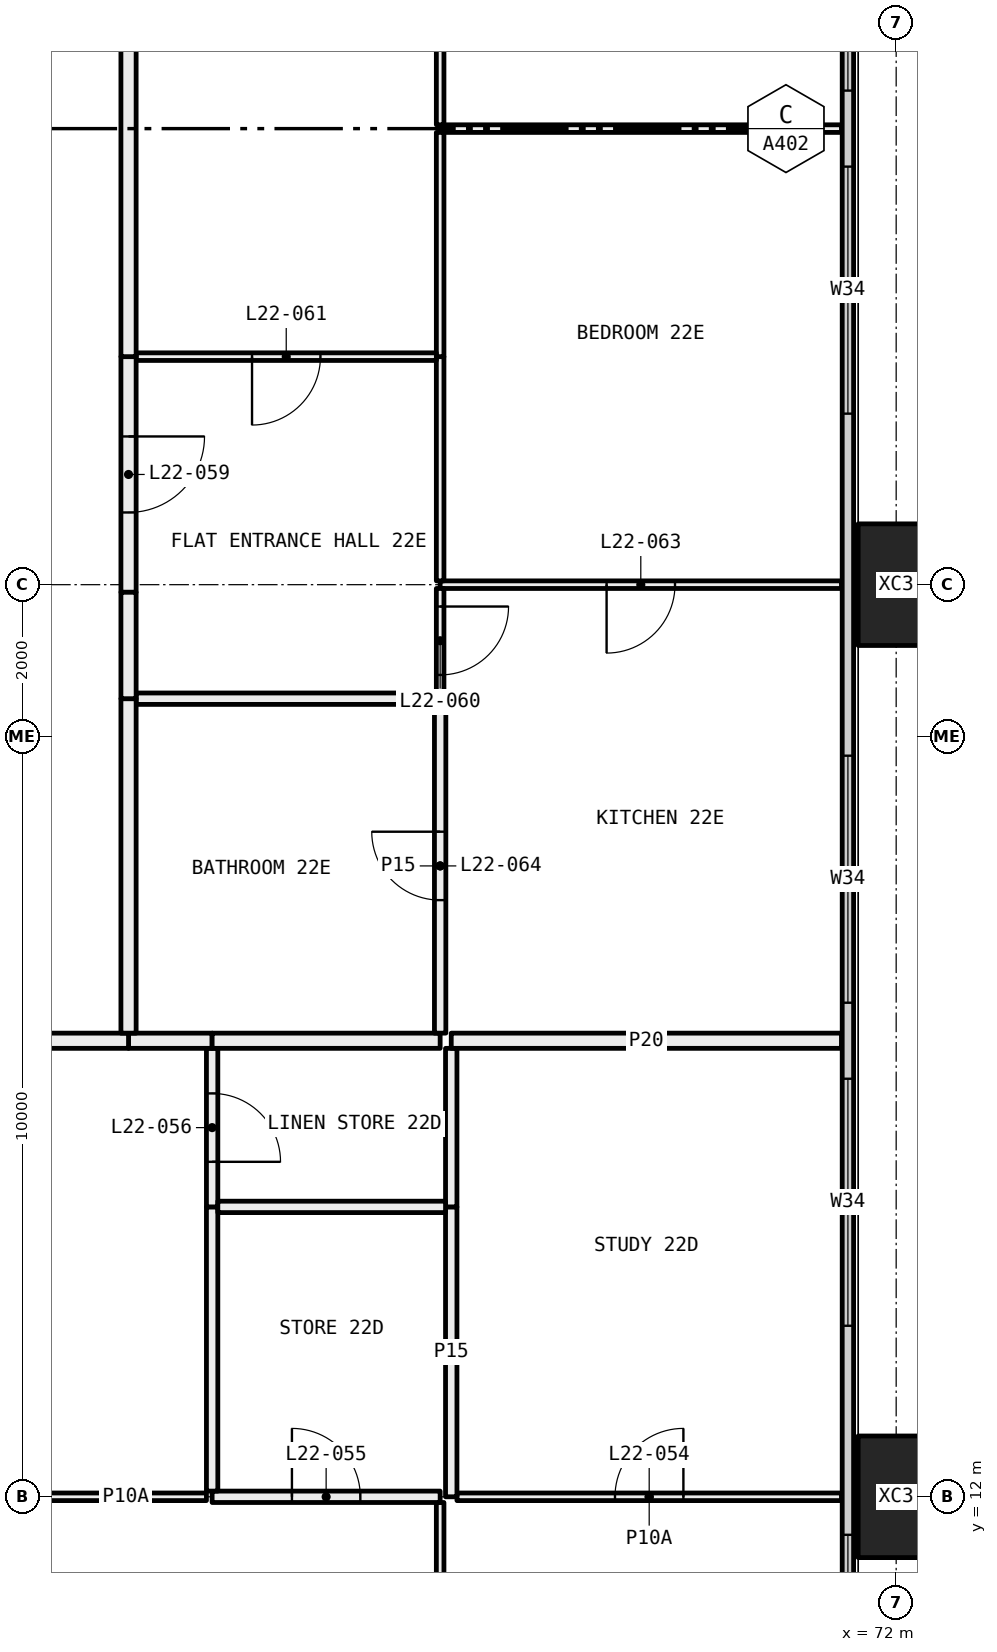
"""IFC4 building model, lengths in metres.
Left out: names, types, materials, properties, quantities, classifications, styles, units other than length and angle.
Written with IfcOpenShell. Run it as: python <this file> out.ifc"""

import sys

from ifc_helpers import new_model, si_unit, direction, frame, frame_2d, origin, origin_2d, place, context, subcontext, project, spatial, rectangle, hollow_rectangle, extrude, element, fill, save


model = new_model("IFC4")
c1 = context("Model", 3, precision=1e-05, world=origin(), true_north=direction((0.0, 1.0)))
c2 = subcontext(c1, "Body", "Model", "MODEL_VIEW")
j1 = project(units=[si_unit("LENGTHUNIT", "METRE"), si_unit("PLANEANGLEUNIT", "RADIAN")], contexts=[c1])
p1 = place(None, origin())
s1 = spatial("IfcSite", under=j1, at=p1, CompositionType="ELEMENT")
p2 = place(p1, origin())
s2 = spatial("IfcBuilding", under=s1, at=p2, CompositionType="ELEMENT")
p3 = place(p2, frame((0.0, 0.0, 88.65)))
s3 = spatial("IfcBuildingStorey", under=s2, at=p3, CompositionType="ELEMENT", Elevation=88.65)
for number, where, z_axis, x_axis in (
    (1, (72.0, 12.0, -0.4), (0.0, 0.0, 1.0), (0.0, 1.0, 0.0)),
    (2, (72.0, 24.0, -0.4), (0.0, 0.0, 1.0), (0.0, 1.0, 0.0)),
):
    element("IfcColumn", number, at=place(p3, frame(where, z_axis=z_axis, x_axis=x_axis)), inside=s3, PredefinedType="COLUMN", context=c2, shape_type="SweptSolid", body=[
        extrude(hollow_rectangle(XDim=1.6, YDim=1.0, WallThickness=0.065, at=origin_2d()), origin(), (0.0, 0.0, 1.0), 3.45),
    ])
p4 = place(p3, frame((71.365, 6.71, 0.0), z_axis=(0.0, 0.0, 1.0), x_axis=(0.0, 1.0, 0.0)))
e3 = element("IfcWall", 3, at=p4, inside=s3, PredefinedType="ELEMENTEDWALL", context=c2, shape_type="SweptSolid", body=[
    extrude(rectangle(XDim=34.58, YDim=0.15, at=frame_2d((17.29, 0.0))), origin(), (0.0, 0.0, 1.0), 3.05),
])
p5 = place(p4, frame((0.29, 0.0, 0.45)))
e4 = element("IfcOpeningElement", 4, at=p5, cuts=e3, PredefinedType="OPENING", context=c2, shape_type="SweptSolid", body=[
    extrude(rectangle(XDim=4.5, YDim=2.55, at=frame_2d((2.25, 1.275))), frame((0.0, 0.085, 0.0), z_axis=(0.0, -1.0, 0.0), x_axis=(1.0, 0.0, 0.0)), (0.0, 0.0, 1.0), 0.17),
])
p6 = place(p4, frame((7.54, 0.0, 0.45)))
e5 = element("IfcOpeningElement", 5, at=p6, cuts=e3, PredefinedType="OPENING", context=c2, shape_type="SweptSolid", body=[
    extrude(rectangle(XDim=3.25, YDim=2.55, at=frame_2d((1.625, 1.275))), frame((0.0, 0.085, 0.0), z_axis=(0.0, -1.0, 0.0), x_axis=(1.0, 0.0, 0.0)), (0.0, 0.0, 1.0), 0.17),
])
p7 = place(p4, frame((11.79, 0.0, 0.45)))
e6 = element("IfcOpeningElement", 6, at=p7, cuts=e3, PredefinedType="OPENING", context=c2, shape_type="SweptSolid", body=[
    extrude(rectangle(XDim=3.25, YDim=2.55, at=frame_2d((1.625, 1.275))), frame((0.0, 0.085, 0.0), z_axis=(0.0, -1.0, 0.0), x_axis=(1.0, 0.0, 0.0)), (0.0, 0.0, 1.0), 0.17),
])
p8 = place(p4, frame((19.54, 0.0, 0.45)))
e7 = element("IfcOpeningElement", 7, at=p8, cuts=e3, PredefinedType="OPENING", context=c2, shape_type="SweptSolid", body=[
    extrude(rectangle(XDim=3.25, YDim=2.55, at=frame_2d((1.625, 1.275))), frame((0.0, 0.085, 0.0), z_axis=(0.0, -1.0, 0.0), x_axis=(1.0, 0.0, 0.0)), (0.0, 0.0, 1.0), 0.17),
])
p9 = place(p4, frame((23.79, 0.0, 0.45)))
e8 = element("IfcOpeningElement", 8, at=p9, cuts=e3, PredefinedType="OPENING", context=c2, shape_type="SweptSolid", body=[
    extrude(rectangle(XDim=2.0, YDim=2.55, at=frame_2d((1.0, 1.275))), frame((0.0, 0.085, 0.0), z_axis=(0.0, -1.0, 0.0), x_axis=(1.0, 0.0, 0.0)), (0.0, 0.0, 1.0), 0.17),
])
p10 = place(p4, frame((29.79, 0.0, 0.45)))
e9 = element("IfcOpeningElement", 9, at=p10, cuts=e3, PredefinedType="OPENING", context=c2, shape_type="SweptSolid", body=[
    extrude(rectangle(XDim=4.5, YDim=2.55, at=frame_2d((2.25, 1.275))), frame((0.0, 0.085, 0.0), z_axis=(0.0, -1.0, 0.0), x_axis=(1.0, 0.0, 0.0)), (0.0, 0.0, 1.0), 0.17),
])
p11 = place(p3, frame((66.0, 6.72, 0.0), z_axis=(0.0, 0.0, 1.0), x_axis=(0.0, 1.0, 0.0)))
e10 = element("IfcWall", 10, at=p11, inside=s3, PredefinedType="PARTITIONING", context=c2, shape_type="SweptSolid", body=[
    extrude(rectangle(XDim=5.205, YDim=0.1, at=frame_2d((2.603, 0.0))), origin(), (0.0, 0.0, 1.0), 2.45),
])
p12 = place(p11, frame((2.153, 0.0, 0.0)))
e11 = element("IfcOpeningElement", 11, at=p12, cuts=e10, PredefinedType="OPENING", context=c2, shape_type="SweptSolid", body=[
    extrude(rectangle(XDim=0.9, YDim=2.1, at=frame_2d((0.45, 1.05))), frame((0.0, 0.06, 0.0), z_axis=(0.0, -1.0, 0.0), x_axis=(1.0, 0.0, 0.0)), (0.0, 0.0, 1.0), 0.12),
])
p13 = place(p3, frame((62.925, 12.0, 0.0), z_axis=(0.0, 0.0, 1.0), x_axis=(-1.0, 0.0, 0.0)))
e12 = element("IfcWall", 12, at=p13, inside=s3, PredefinedType="PARTITIONING", context=c2, shape_type="SweptSolid", body=[
    extrude(rectangle(XDim=2.125, YDim=0.1, at=frame_2d((1.062, 0.0))), origin(), (0.0, 0.0, 1.0), 2.45),
])
p14 = place(p3, frame((66.0, 12.0, 0.0), z_axis=(0.0, 0.0, 1.0), x_axis=(-1.0, 0.0, 0.0)))
e13 = element("IfcWall", 13, at=p14, inside=s3, PredefinedType="PARTITIONING", context=c2, shape_type="SweptSolid", body=[
    extrude(rectangle(XDim=3.0, YDim=0.15, at=frame_2d((1.5, 0.0))), origin(), (0.0, 0.0, 1.0), 2.45),
])
p15 = place(p14, frame((1.05, 0.0, 0.0)))
e14 = element("IfcOpeningElement", 14, at=p15, cuts=e13, PredefinedType="OPENING", context=c2, shape_type="SweptSolid", body=[
    extrude(rectangle(XDim=0.9, YDim=2.1, at=frame_2d((0.45, 1.05))), frame((0.0, 0.085, 0.0), z_axis=(0.0, -1.0, 0.0), x_axis=(1.0, 0.0, 0.0)), (0.0, 0.0, 1.0), 0.17),
])
p16 = place(p3, frame((71.28, 12.0, 0.0), z_axis=(0.0, 0.0, 1.0), x_axis=(-1.0, 0.0, 0.0)))
e15 = element("IfcWall", 15, at=p16, inside=s3, PredefinedType="PARTITIONING", context=c2, shape_type="SweptSolid", body=[
    extrude(rectangle(XDim=5.059, YDim=0.1, at=frame_2d((2.53, 0.0))), origin(), (0.0, 0.0, 1.0), 2.45),
])
p17 = place(p16, frame((2.08, 0.0, 0.0)))
e16 = element("IfcOpeningElement", 16, at=p17, cuts=e15, PredefinedType="OPENING", context=c2, shape_type="SweptSolid", body=[
    extrude(rectangle(XDim=0.9, YDim=2.1, at=frame_2d((0.45, 1.05))), frame((0.0, 0.06, 0.0), z_axis=(0.0, -1.0, 0.0), x_axis=(1.0, 0.0, 0.0)), (0.0, 0.0, 1.0), 0.12),
])
p18 = place(p3, frame((63.0, 12.075, 0.0), z_axis=(0.0, 0.0, 1.0), x_axis=(0.0, 1.0, 0.0)))
e17 = element("IfcWall", 17, at=p18, inside=s3, PredefinedType="PARTITIONING", context=c2, shape_type="SweptSolid", body=[
    extrude(rectangle(XDim=3.739, YDim=0.15, at=frame_2d((1.87, 0.0))), origin(), (0.0, 0.0, 1.0), 2.45),
])
p19 = place(p3, frame((63.0, 15.814, 0.0), z_axis=(0.0, 0.0, 1.0), x_axis=(0.0, 1.0, 0.0)))
e18 = element("IfcWall", 18, at=p19, inside=s3, PredefinedType="PARTITIONING", context=c2, shape_type="SweptSolid", body=[
    extrude(rectangle(XDim=2.086, YDim=0.15, at=frame_2d((1.043, 0.0))), origin(), (0.0, 0.0, 1.0), 3.05),
])
p20 = place(p19, frame((0.593, 0.0, 0.0)))
e19 = element("IfcOpeningElement", 19, at=p20, cuts=e18, PredefinedType="OPENING", context=c2, shape_type="SweptSolid", body=[
    extrude(rectangle(XDim=0.9, YDim=2.1, at=frame_2d((0.45, 1.05))), frame((0.0, 0.085, 0.0), z_axis=(0.0, -1.0, 0.0), x_axis=(1.0, 0.0, 0.0)), (0.0, 0.0, 1.0), 0.17),
])
p21 = place(p3, frame((63.0, 18.0, 0.0), z_axis=(0.0, 0.0, 1.0), x_axis=(-1.0, 0.0, 0.0)))
e20 = element("IfcWall", 20, at=p21, inside=s3, PredefinedType="PARTITIONING", context=c2, shape_type="SweptSolid", body=[
    extrude(rectangle(XDim=1.1, YDim=0.2, at=frame_2d((0.55, 0.0))), origin(), (0.0, 0.0, 1.0), 3.05),
])
p22 = place(p3, frame((61.9, 18.0, 0.0), z_axis=(0.0, 0.0, 1.0), x_axis=(-1.0, 0.0, 0.0)))
e21 = element("IfcWall", 21, at=p22, inside=s3, PredefinedType="PARTITIONING", context=c2, shape_type="SweptSolid", body=[
    extrude(rectangle(XDim=7.9, YDim=0.2, at=frame_2d((3.95, 0.0))), origin(), (0.0, 0.0, 1.0), 3.05),
])
p23 = place(p3, frame((66.146, 15.814, 0.0), z_axis=(0.0, 0.0, 1.0), x_axis=(0.0, -1.0, 0.0)))
e22 = element("IfcWall", 22, at=p23, inside=s3, PredefinedType="PARTITIONING", context=c2, shape_type="SweptSolid", body=[
    extrude(rectangle(XDim=3.814, YDim=0.15, at=frame_2d((1.907, 0.0))), origin(), (0.0, 0.0, 1.0), 2.45),
])
p24 = place(p3, frame((66.146, 17.9, 0.0), z_axis=(0.0, 0.0, 1.0), x_axis=(0.0, -1.0, 0.0)))
e23 = element("IfcWall", 23, at=p24, inside=s3, PredefinedType="PARTITIONING", context=c2, shape_type="SweptSolid", body=[
    extrude(rectangle(XDim=2.086, YDim=0.15, at=frame_2d((1.043, 0.0))), origin(), (0.0, 0.0, 1.0), 2.55),
])
p25 = place(p3, frame((71.28, 18.0, 0.0), z_axis=(0.0, 0.0, 1.0), x_axis=(-1.0, 0.0, 0.0)))
e24 = element("IfcWall", 24, at=p25, inside=s3, PredefinedType="PARTITIONING", context=c2, shape_type="SweptSolid", body=[
    extrude(rectangle(XDim=5.134, YDim=0.2, at=frame_2d((2.567, 0.0))), origin(), (0.0, 0.0, 1.0), 3.05),
])
p26 = place(p3, frame((66.071, 15.814, 0.0), z_axis=(0.0, 0.0, 1.0), x_axis=(-1.0, 0.0, 0.0)))
e25 = element("IfcWall", 25, at=p26, inside=s3, PredefinedType="PARTITIONING", context=c2, shape_type="SweptSolid", body=[
    extrude(rectangle(XDim=2.996, YDim=0.15, at=frame_2d((1.498, 0.0))), origin(), (0.0, 0.0, 1.0), 3.05),
])
p27 = place(p3, frame((66.0, 18.0, 0.0), z_axis=(0.0, 0.0, 1.0), x_axis=(-1.0, 0.0, 0.0)))
e26 = element("IfcWall", 26, at=p27, inside=s3, PredefinedType="PARTITIONING", context=c2, shape_type="SweptSolid", body=[
    extrude(rectangle(XDim=3.0, YDim=0.2, at=frame_2d((1.5, 0.0))), origin(), (0.0, 0.0, 1.0), 3.05),
])
p28 = place(p3, frame((71.28, 24.0, 0.0), z_axis=(0.0, 0.0, 1.0), x_axis=(-1.0, 0.0, 0.0)))
e27 = element("IfcWall", 27, at=p28, inside=s3, PredefinedType="PARTITIONING", context=c2, shape_type="SweptSolid", body=[
    extrude(rectangle(XDim=5.28, YDim=0.1, at=frame_2d((2.64, 0.0))), origin(), (0.0, 0.0, 1.0), 2.45),
])
p29 = place(p28, frame((2.19, 0.0, 0.0)))
e28 = element("IfcOpeningElement", 28, at=p29, cuts=e27, PredefinedType="OPENING", context=c2, shape_type="SweptSolid", body=[
    extrude(rectangle(XDim=0.9, YDim=2.1, at=frame_2d((0.45, 1.05))), frame((0.0, 0.06, 0.0), z_axis=(0.0, -1.0, 0.0), x_axis=(1.0, 0.0, 0.0)), (0.0, 0.0, 1.0), 0.12),
])
p30 = place(p3, frame((66.0, 22.5, 0.0), z_axis=(0.0, 0.0, 1.0), x_axis=(0.0, -1.0, 0.0)))
e29 = element("IfcWall", 29, at=p30, inside=s3, PredefinedType="PARTITIONING", context=c2, shape_type="SweptSolid", body=[
    extrude(rectangle(XDim=4.4, YDim=0.15, at=frame_2d((2.2, 0.0))), origin(), (0.0, 0.0, 1.0), 3.05),
])
p31 = place(p30, frame((1.75, 0.0, 0.0)))
e30 = element("IfcOpeningElement", 30, at=p31, cuts=e29, PredefinedType="OPENING", context=c2, shape_type="SweptSolid", body=[
    extrude(rectangle(XDim=0.9, YDim=2.1, at=frame_2d((0.45, 1.05))), frame((0.0, 0.085, 0.0), z_axis=(0.0, -1.0, 0.0), x_axis=(1.0, 0.0, 0.0)), (0.0, 0.0, 1.0), 0.17),
])
p32 = place(p3, frame((66.0, 23.95, 0.0), z_axis=(0.0, 0.0, 1.0), x_axis=(0.0, -1.0, 0.0)))
e31 = element("IfcWall", 31, at=p32, inside=s3, PredefinedType="PARTITIONING", context=c2, shape_type="SweptSolid", body=[
    extrude(rectangle(XDim=1.375, YDim=0.1, at=frame_2d((0.688, 0.0))), origin(), (0.0, 0.0, 1.0), 2.45),
])
p33 = place(p32, frame((0.238, 0.0, 0.0)))
e32 = element("IfcOpeningElement", 32, at=p33, cuts=e31, PredefinedType="OPENING", context=c2, shape_type="SweptSolid", body=[
    extrude(rectangle(XDim=0.9, YDim=2.1, at=frame_2d((0.45, 1.05))), frame((0.0, 0.06, 0.0), z_axis=(0.0, -1.0, 0.0), x_axis=(1.0, 0.0, 0.0)), (0.0, 0.0, 1.0), 0.12),
])
p34 = place(p3, frame((71.28, 30.0, 0.0), z_axis=(0.0, 0.0, 1.0), x_axis=(-1.0, 0.0, 0.0)))
e33 = element("IfcWall", 33, at=p34, inside=s3, PredefinedType="PARTITIONING", context=c2, shape_type="SweptSolid", body=[
    extrude(rectangle(XDim=5.28, YDim=0.1, at=frame_2d((2.64, 0.0))), origin(), (0.0, 0.0, 1.0), 3.05),
])
p35 = place(p3, frame((66.0, 27.0, 0.0), z_axis=(0.0, 0.0, 1.0), x_axis=(0.0, -1.0, 0.0)))
e34 = element("IfcWall", 34, at=p35, inside=s3, PredefinedType="PARTITIONING", context=c2, shape_type="SweptSolid", body=[
    extrude(rectangle(XDim=2.95, YDim=0.1, at=frame_2d((1.475, 0.0))), origin(), (0.0, 0.0, 1.0), 2.45),
])
p36 = place(p3, frame((66.0, 29.95, 0.0), z_axis=(0.0, 0.0, 1.0), x_axis=(0.0, -1.0, 0.0)))
e35 = element("IfcWall", 35, at=p36, inside=s3, PredefinedType="PARTITIONING", context=c2, shape_type="SweptSolid", body=[
    extrude(rectangle(XDim=2.95, YDim=0.1, at=frame_2d((1.475, 0.0))), origin(), (0.0, 0.0, 1.0), 3.05),
])
p37 = place(p3, frame((66.0, 35.9, 0.0), z_axis=(0.0, 0.0, 1.0), x_axis=(0.0, -1.0, 0.0)))
e36 = element("IfcWall", 36, at=p37, inside=s3, PredefinedType="PARTITIONING", context=c2, shape_type="SweptSolid", body=[
    extrude(rectangle(XDim=5.85, YDim=0.1, at=frame_2d((2.925, 0.0))), origin(), (0.0, 0.0, 1.0), 3.05),
])
p38 = place(p37, frame((2.475, 0.0, 0.0)))
e37 = element("IfcOpeningElement", 37, at=p38, cuts=e36, PredefinedType="OPENING", context=c2, shape_type="SweptSolid", body=[
    extrude(rectangle(XDim=0.9, YDim=2.1, at=frame_2d((0.45, 1.05))), frame((0.0, 0.06, 0.0), z_axis=(0.0, -1.0, 0.0), x_axis=(1.0, 0.0, 0.0)), (0.0, 0.0, 1.0), 0.12),
])
p39 = place(p3, frame((65.925, 22.5, 0.0), z_axis=(0.0, 0.0, 1.0), x_axis=(-1.0, 0.0, 0.0)))
e38 = element("IfcWall", 38, at=p39, inside=s3, PredefinedType="PARTITIONING", context=c2, shape_type="SweptSolid", body=[
    extrude(rectangle(XDim=3.925, YDim=0.15, at=frame_2d((1.962, 0.0))), origin(), (0.0, 0.0, 1.0), 3.05),
])
p40 = place(p3, frame((61.9, 22.5, 0.0), z_axis=(0.0, 0.0, 1.0), x_axis=(0.0, -1.0, 0.0)))
e39 = element("IfcWall", 39, at=p40, inside=s3, PredefinedType="PARTITIONING", context=c2, shape_type="SweptSolid", body=[
    extrude(rectangle(XDim=4.4, YDim=0.2, at=frame_2d((2.2, 0.0))), origin(), (0.0, 0.0, 1.0), 3.05),
])
p41 = place(p3, frame((65.95, 27.0, 0.0), z_axis=(0.0, 0.0, 1.0), x_axis=(-1.0, 0.0, 0.0)))
e40 = element("IfcWall", 40, at=p41, inside=s3, PredefinedType="PARTITIONING", context=c2, shape_type="SweptSolid", body=[
    extrude(rectangle(XDim=3.95, YDim=0.1, at=frame_2d((1.975, 0.0))), origin(), (0.0, 0.0, 1.0), 3.05),
])
p42 = place(p41, frame((1.525, 0.0, 0.0)))
e41 = element("IfcOpeningElement", 41, at=p42, cuts=e40, PredefinedType="OPENING", context=c2, shape_type="SweptSolid", body=[
    extrude(rectangle(XDim=0.9, YDim=2.1, at=frame_2d((0.45, 1.05))), frame((0.0, 0.06, 0.0), z_axis=(0.0, -1.0, 0.0), x_axis=(1.0, 0.0, 0.0)), (0.0, 0.0, 1.0), 0.12),
])
p43 = place(p3, frame((61.9, 27.0, 0.0), z_axis=(0.0, 0.0, 1.0), x_axis=(0.0, -1.0, 0.0)))
e42 = element("IfcWall", 42, at=p43, inside=s3, PredefinedType="PARTITIONING", context=c2, shape_type="SweptSolid", body=[
    extrude(rectangle(XDim=3.1, YDim=0.2, at=frame_2d((1.55, 0.0))), origin(), (0.0, 0.0, 1.0), 2.45),
])
p44 = place(p43, frame((1.05, 0.0, 0.0)))
e43 = element("IfcOpeningElement", 43, at=p44, cuts=e42, PredefinedType="OPENING", context=c2, shape_type="SweptSolid", body=[
    extrude(rectangle(XDim=1.0, YDim=2.1, at=frame_2d((0.5, 1.05))), frame((0.0, 0.11, 0.0), z_axis=(0.0, -1.0, 0.0), x_axis=(1.0, 0.0, 0.0)), (0.0, 0.0, 1.0), 0.22),
])
p45 = place(p3, frame((61.9, 23.9, 0.0), z_axis=(0.0, 0.0, 1.0), x_axis=(0.0, -1.0, 0.0)))
e44 = element("IfcWall", 44, at=p45, inside=s3, PredefinedType="PARTITIONING", context=c2, shape_type="SweptSolid", body=[
    extrude(rectangle(XDim=1.4, YDim=0.2, at=frame_2d((0.7, 0.0))), origin(), (0.0, 0.0, 1.0), 3.05),
])
p46 = place(p3, frame((61.9, 35.9, 0.0), z_axis=(0.0, 0.0, 1.0), x_axis=(0.0, -1.0, 0.0)))
e45 = element("IfcWall", 45, at=p46, inside=s3, PredefinedType="PARTITIONING", context=c2, shape_type="SweptSolid", body=[
    extrude(rectangle(XDim=8.9, YDim=0.2, at=frame_2d((4.45, 0.0))), origin(), (0.0, 0.0, 1.0), 3.05),
])
p47 = place(p5, origin())
e46 = element("IfcWindow", 46, at=p47, inside=s3, PartitioningType="SINGLE_PANEL", PredefinedType="WINDOW", context=c2, shape_type="SweptSolid", body=[
    extrude(rectangle(XDim=4.5, YDim=2.55, at=frame_2d((2.25, 1.275))), frame((0.0, 0.03, 0.0), z_axis=(0.0, -1.0, 0.0), x_axis=(1.0, 0.0, 0.0)), (0.0, 0.0, 1.0), 0.06),
])
fill(e4, e46)
p48 = place(p6, origin())
e47 = element("IfcWindow", 47, at=p48, inside=s3, PartitioningType="SINGLE_PANEL", PredefinedType="WINDOW", context=c2, shape_type="SweptSolid", body=[
    extrude(rectangle(XDim=3.25, YDim=2.55, at=frame_2d((1.625, 1.275))), frame((0.0, 0.03, 0.0), z_axis=(0.0, -1.0, 0.0), x_axis=(1.0, 0.0, 0.0)), (0.0, 0.0, 1.0), 0.06),
])
fill(e5, e47)
p49 = place(p7, origin())
e48 = element("IfcWindow", 48, at=p49, inside=s3, PartitioningType="SINGLE_PANEL", PredefinedType="WINDOW", context=c2, shape_type="SweptSolid", body=[
    extrude(rectangle(XDim=3.25, YDim=2.55, at=frame_2d((1.625, 1.275))), frame((0.0, 0.03, 0.0), z_axis=(0.0, -1.0, 0.0), x_axis=(1.0, 0.0, 0.0)), (0.0, 0.0, 1.0), 0.06),
])
fill(e6, e48)
p50 = place(p8, origin())
e49 = element("IfcWindow", 49, at=p50, inside=s3, PartitioningType="SINGLE_PANEL", PredefinedType="WINDOW", context=c2, shape_type="SweptSolid", body=[
    extrude(rectangle(XDim=3.25, YDim=2.55, at=frame_2d((1.625, 1.275))), frame((0.0, 0.03, 0.0), z_axis=(0.0, -1.0, 0.0), x_axis=(1.0, 0.0, 0.0)), (0.0, 0.0, 1.0), 0.06),
])
fill(e7, e49)
p51 = place(p9, origin())
e50 = element("IfcWindow", 50, at=p51, inside=s3, PartitioningType="SINGLE_PANEL", PredefinedType="WINDOW", context=c2, shape_type="SweptSolid", body=[
    extrude(rectangle(XDim=2.0, YDim=2.55, at=frame_2d((1.0, 1.275))), frame((0.0, 0.03, 0.0), z_axis=(0.0, -1.0, 0.0), x_axis=(1.0, 0.0, 0.0)), (0.0, 0.0, 1.0), 0.06),
])
fill(e8, e50)
p52 = place(p17, frame((0.9, 0.0, 0.0), x_axis=(-1.0, 0.0, 0.0)))
e51 = element("IfcDoor", 51, at=p52, inside=s3, OperationType="SINGLE_SWING_LEFT", PredefinedType="DOOR", context=c2, shape_type="SweptSolid", body=[
    extrude(rectangle(XDim=0.9, YDim=2.1, at=frame_2d((0.45, 1.05))), frame((0.0, 0.025, 0.0), z_axis=(0.0, -1.0, 0.0), x_axis=(1.0, 0.0, 0.0)), (0.0, 0.0, 1.0), 0.05),
])
fill(e16, e51)
p53 = place(p15, frame((0.9, 0.0, 0.0), x_axis=(-1.0, 0.0, 0.0)))
e52 = element("IfcDoor", 52, at=p53, inside=s3, OperationType="SINGLE_SWING_RIGHT", PredefinedType="DOOR", context=c2, shape_type="SweptSolid", body=[
    extrude(rectangle(XDim=0.9, YDim=2.1, at=frame_2d((0.45, 1.05))), frame((0.0, 0.025, 0.0), z_axis=(0.0, -1.0, 0.0), x_axis=(1.0, 0.0, 0.0)), (0.0, 0.0, 1.0), 0.05),
])
fill(e14, e52)
p54 = place(p20, frame((0.9, 0.0, 0.0), x_axis=(-1.0, 0.0, 0.0)))
e53 = element("IfcDoor", 53, at=p54, inside=s3, OperationType="SINGLE_SWING_LEFT", PredefinedType="DOOR", context=c2, shape_type="SweptSolid", body=[
    extrude(rectangle(XDim=0.9, YDim=2.1, at=frame_2d((0.45, 1.05))), frame((0.0, 0.025, 0.0), z_axis=(0.0, -1.0, 0.0), x_axis=(1.0, 0.0, 0.0)), (0.0, 0.0, 1.0), 0.05),
])
fill(e19, e53)
p55 = place(p44, origin())
e54 = element("IfcDoor", 54, at=p55, inside=s3, OperationType="SINGLE_SWING_RIGHT", PredefinedType="DOOR", context=c2, shape_type="SweptSolid", body=[
    extrude(rectangle(XDim=1.0, YDim=2.1, at=frame_2d((0.5, 1.05))), frame((0.0, 0.025, 0.0), z_axis=(0.0, -1.0, 0.0), x_axis=(1.0, 0.0, 0.0)), (0.0, 0.0, 1.0), 0.05),
])
fill(e43, e54)
p56 = place(p33, origin())
e55 = element("IfcDoor", 55, at=p56, inside=s3, OperationType="SINGLE_SWING_RIGHT", PredefinedType="DOOR", context=c2, shape_type="SweptSolid", body=[
    extrude(rectangle(XDim=0.9, YDim=2.1, at=frame_2d((0.45, 1.05))), frame((0.0, 0.025, 0.0), z_axis=(0.0, -1.0, 0.0), x_axis=(1.0, 0.0, 0.0)), (0.0, 0.0, 1.0), 0.05),
])
fill(e32, e55)
p57 = place(p42, origin())
e56 = element("IfcDoor", 56, at=p57, inside=s3, OperationType="SINGLE_SWING_LEFT", PredefinedType="DOOR", context=c2, shape_type="SweptSolid", body=[
    extrude(rectangle(XDim=0.9, YDim=2.1, at=frame_2d((0.45, 1.05))), frame((0.0, 0.025, 0.0), z_axis=(0.0, -1.0, 0.0), x_axis=(1.0, 0.0, 0.0)), (0.0, 0.0, 1.0), 0.05),
])
fill(e41, e56)
p58 = place(p29, origin())
e57 = element("IfcDoor", 57, at=p58, inside=s3, OperationType="SINGLE_SWING_LEFT", PredefinedType="DOOR", context=c2, shape_type="SweptSolid", body=[
    extrude(rectangle(XDim=0.9, YDim=2.1, at=frame_2d((0.45, 1.05))), frame((0.0, 0.025, 0.0), z_axis=(0.0, -1.0, 0.0), x_axis=(1.0, 0.0, 0.0)), (0.0, 0.0, 1.0), 0.05),
])
fill(e28, e57)
p59 = place(p31, frame((0.9, 0.0, 0.0), x_axis=(-1.0, 0.0, 0.0)))
e58 = element("IfcDoor", 58, at=p59, inside=s3, OperationType="SINGLE_SWING_LEFT", PredefinedType="DOOR", context=c2, shape_type="SweptSolid", body=[
    extrude(rectangle(XDim=0.9, YDim=2.1, at=frame_2d((0.45, 1.05))), frame((0.0, 0.025, 0.0), z_axis=(0.0, -1.0, 0.0), x_axis=(1.0, 0.0, 0.0)), (0.0, 0.0, 1.0), 0.05),
])
fill(e30, e58)
save(model, sys.argv[1])
